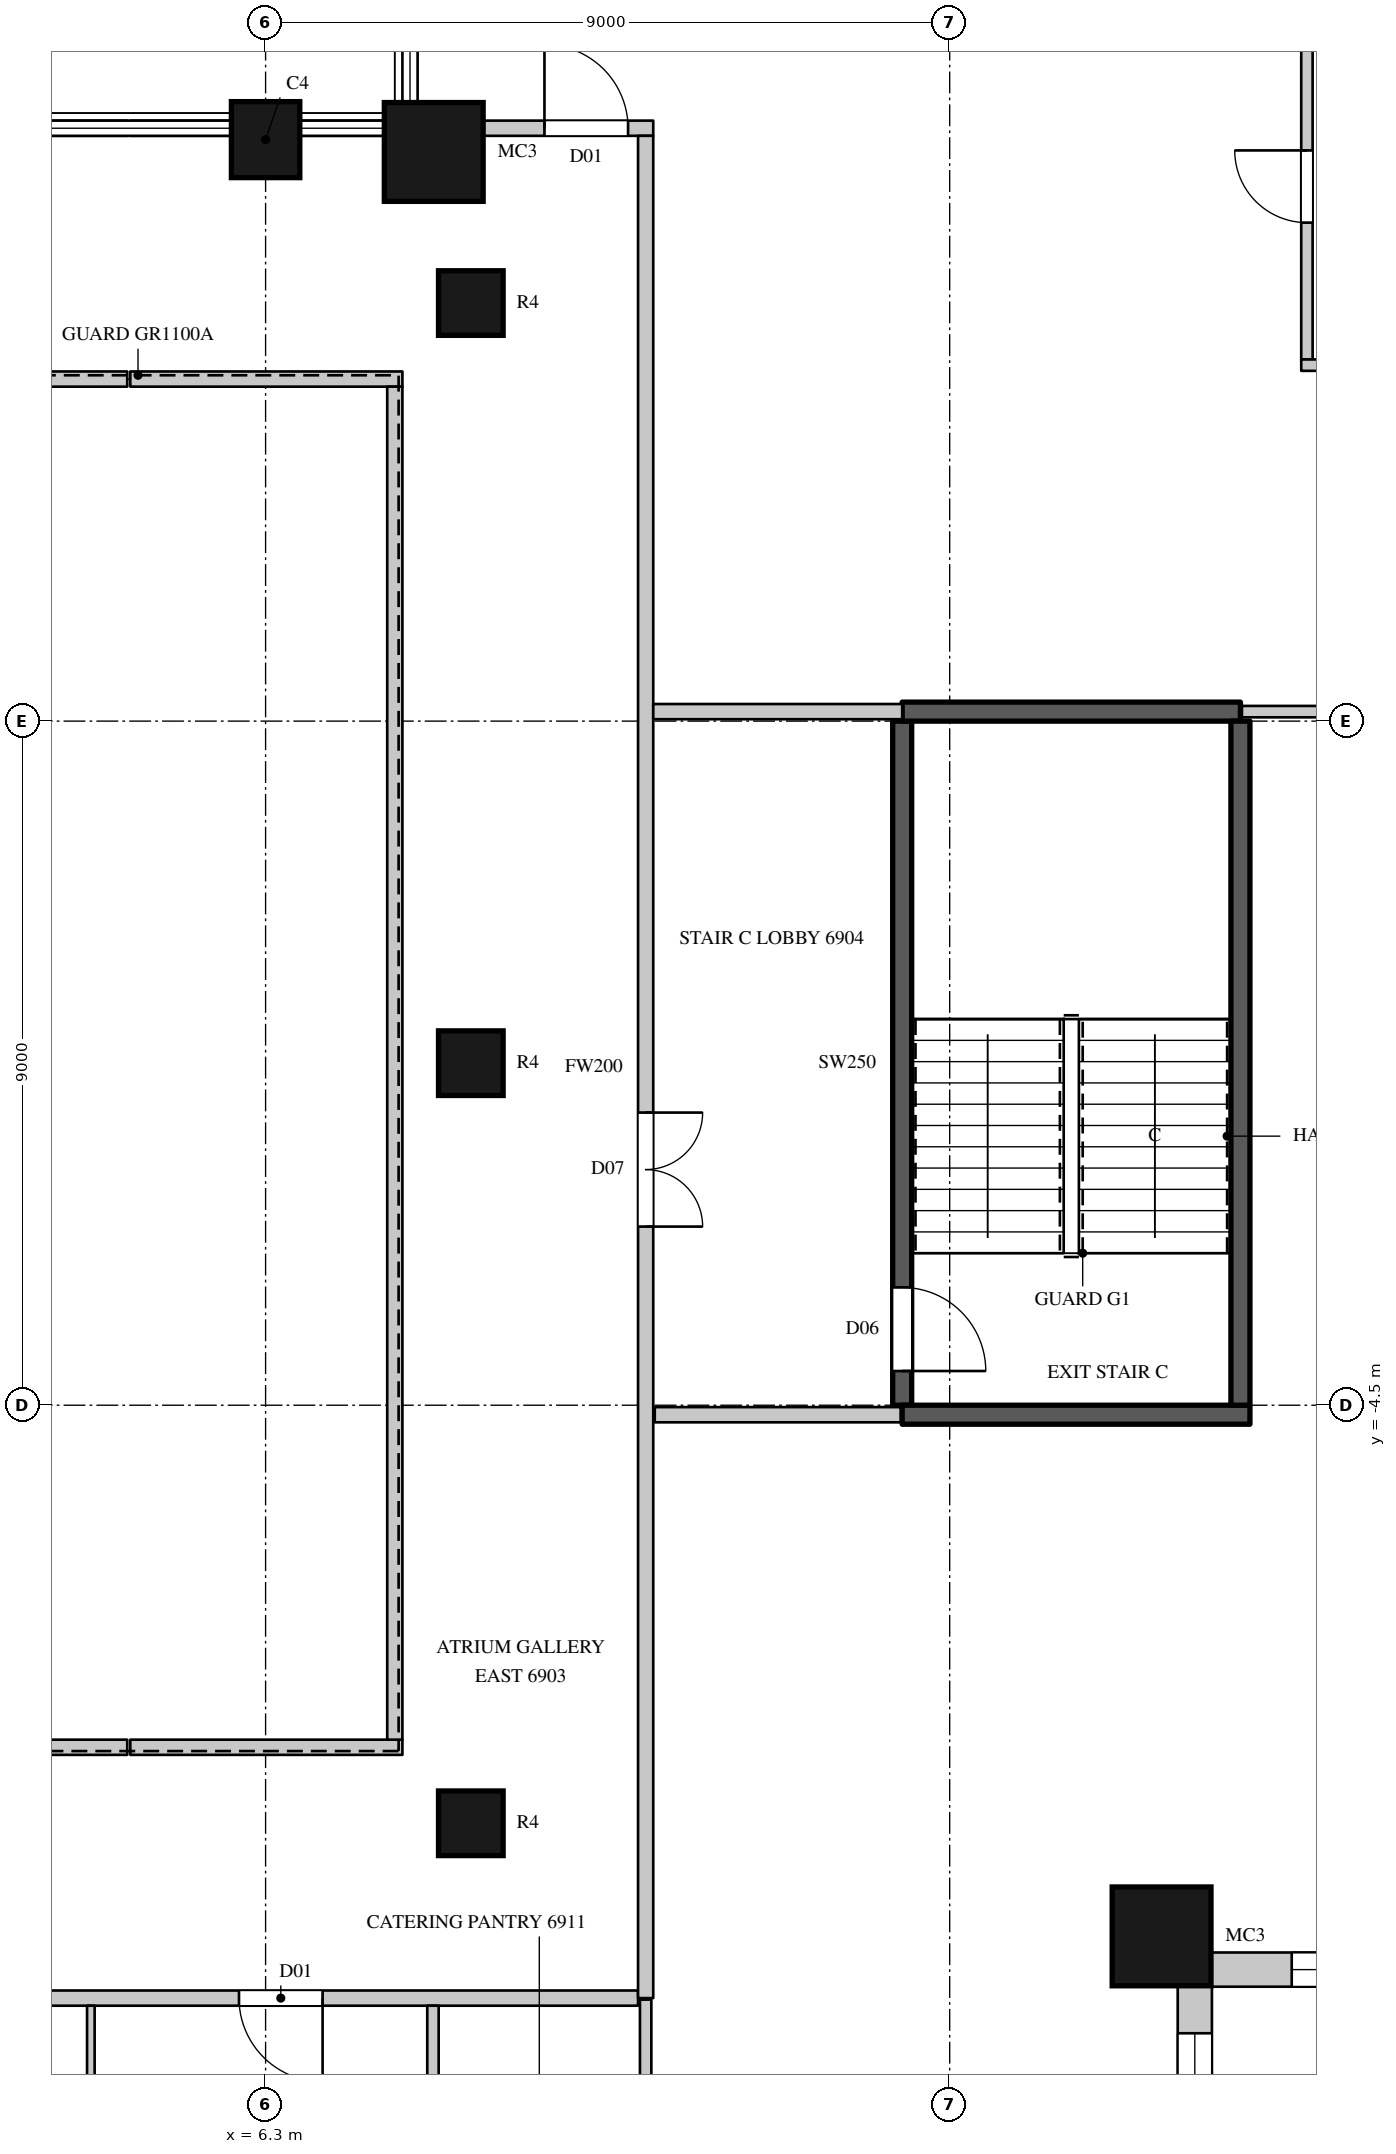
"""IFC4 building model, lengths in metres.
Left out: names, types, materials, properties, quantities, classifications, styles, units other than length and angle.
Written with IfcOpenShell. Run it as: python <this file> out.ifc"""

import sys

from ifc_helpers import new_model, si_unit, direction, frame, frame_2d, origin, origin_2d, place, context, subcontext, project, spatial, rectangle, circle, extrude, element, fill, save


model = new_model("IFC4")
c1 = context("Model", 3, precision=1e-05, world=origin(), true_north=direction((0.0, 1.0)))
c2 = subcontext(c1, "Body", "Model", "MODEL_VIEW")
j1 = project(units=[si_unit("LENGTHUNIT", "METRE"), si_unit("PLANEANGLEUNIT", "RADIAN")], contexts=[c1])
p1 = place(None, origin())
s1 = spatial("IfcSite", under=j1, at=p1, CompositionType="ELEMENT")
p2 = place(p1, origin())
s2 = spatial("IfcBuilding", under=s1, at=p2, CompositionType="ELEMENT")
p3 = place(p2, frame((0.0, 0.0, 304.9)))
s3 = spatial("IfcBuildingStorey", under=s2, at=p3, CompositionType="ELEMENT", Elevation=304.9)
p4 = place(p3, frame((8.512, 11.988, 0.0), z_axis=(0.0, 0.0, 1.0), x_axis=(1.0, 0.0, 0.0)))
e1 = element("IfcColumn", 1, at=p4, inside=s3, PredefinedType="COLUMN", context=c2, shape_type="SweptSolid", body=[
    extrude(circle(Radius=0.65, at=origin_2d()), origin(), (0.0, 0.0, 1.0), 4.1),
])
p5 = place(p3, frame((6.3, 12.15, 0.0), z_axis=(0.0, 0.0, 1.0), x_axis=(-1.0, 0.0, 0.0)))
e2 = element("IfcColumn", 2, at=p5, inside=s3, PredefinedType="COLUMN", context=c2, shape_type="SweptSolid", body=[
    extrude(rectangle(XDim=0.9, YDim=1.0, at=origin_2d()), origin(), (0.0, 0.0, 1.0), 4.1),
])
p6 = place(p3, frame((18.088, -11.488, 0.0), z_axis=(0.0, 0.0, 1.0), x_axis=(1.0, 0.0, 0.0)))
e3 = element("IfcColumn", 3, at=p6, inside=s3, PredefinedType="COLUMN", context=c2, shape_type="SweptSolid", body=[
    extrude(circle(Radius=0.65, at=origin_2d()), origin(), (0.0, 0.0, 1.0), 4.1),
])
for number, where, z_axis, x_axis in (
    (4, (9.0, -10.0, 0.0), (0.0, 0.0, 1.0), (1.0, 0.0, 0.0)),
    (5, (9.0, 0.0, 0.0), (0.0, 0.0, 1.0), (1.0, 0.0, 0.0)),
    (6, (9.0, 10.0, 0.0), (0.0, 0.0, 1.0), (1.0, 0.0, 0.0)),
):
    element("IfcColumn", number, at=place(p3, frame(where, z_axis=z_axis, x_axis=x_axis)), inside=s3, PredefinedType="COLUMN", context=c2, shape_type="SweptSolid", body=[
        extrude(circle(Radius=0.425, at=origin_2d()), origin(), (0.0, 0.0, 1.0), 4.1),
    ])
p7 = place(p3, frame((18.525, -16.304, 0.0), z_axis=(0.0, 0.0, 1.0), x_axis=(0.0, 1.0, 0.0)))
e7 = element("IfcWall", 7, at=p7, inside=s3, PredefinedType="SOLIDWALL", context=c2, shape_type="SweptSolid", body=[
    extrude(rectangle(XDim=4.202, YDim=0.45, at=frame_2d((2.101, 0.0))), origin(), (0.0, 0.0, 1.0), 3.8),
])
p8 = place(p7, frame((0.541, 0.0, 1.05)))
e8 = element("IfcOpeningElement", 8, at=p8, cuts=e7, PredefinedType="OPENING", context=c2, shape_type="SweptSolid", body=[
    extrude(rectangle(XDim=3.0, YDim=2.4, at=frame_2d((1.5, 1.2))), frame((0.0, 0.235, 0.0), z_axis=(0.0, -1.0, 0.0), x_axis=(1.0, 0.0, 0.0)), (0.0, 0.0, 1.0), 0.47),
])
p9 = place(p3, frame((18.701, -11.925, 0.0), z_axis=(0.0, 0.0, 1.0), x_axis=(1.0, 0.0, 0.0)))
e9 = element("IfcWall", 9, at=p9, inside=s3, PredefinedType="SOLIDWALL", context=c2, shape_type="SweptSolid", body=[
    extrude(rectangle(XDim=4.962, YDim=0.45, at=frame_2d((2.481, 0.0))), origin(), (0.0, 0.0, 1.0), 3.8),
])
p10 = place(p9, frame((1.098, 0.0, 1.05)))
e10 = element("IfcOpeningElement", 10, at=p10, cuts=e9, PredefinedType="OPENING", context=c2, shape_type="SweptSolid", body=[
    extrude(rectangle(XDim=3.0, YDim=2.4, at=frame_2d((1.5, 1.2))), frame((0.0, 0.235, 0.0), z_axis=(0.0, -1.0, 0.0), x_axis=(1.0, 0.0, 0.0)), (0.0, 0.0, 1.0), 0.47),
])
p11 = place(p3, frame((-10.9, -12.3, 0.0), z_axis=(0.0, 0.0, 1.0), x_axis=(1.0, 0.0, 0.0)))
e11 = element("IfcWall", 11, at=p11, inside=s3, PredefinedType="PARTITIONING", context=c2, shape_type="SweptSolid", body=[
    extrude(rectangle(XDim=22.1, YDim=0.2, at=frame_2d((11.05, 0.0))), origin(), (0.0, 0.0, 1.0), 3.8),
])
p12 = place(p11, frame((0.95, 0.0, 0.0)))
e12 = element("IfcOpeningElement", 12, at=p12, cuts=e11, PredefinedType="OPENING", context=c2, shape_type="SweptSolid", body=[
    extrude(rectangle(XDim=0.9, YDim=2.2, at=frame_2d((0.45, 1.1))), frame((0.0, 0.11, 0.0), z_axis=(0.0, -1.0, 0.0), x_axis=(1.0, 0.0, 0.0)), (0.0, 0.0, 1.0), 0.22),
])
p13 = place(p11, frame((3.95, 0.0, 0.0)))
e13 = element("IfcOpeningElement", 13, at=p13, cuts=e11, PredefinedType="OPENING", context=c2, shape_type="SweptSolid", body=[
    extrude(rectangle(XDim=0.9, YDim=2.2, at=frame_2d((0.45, 1.1))), frame((0.0, 0.11, 0.0), z_axis=(0.0, -1.0, 0.0), x_axis=(1.0, 0.0, 0.0)), (0.0, 0.0, 1.0), 0.22),
])
p14 = place(p11, frame((7.1, 0.0, 0.0)))
e14 = element("IfcOpeningElement", 14, at=p14, cuts=e11, PredefinedType="OPENING", context=c2, shape_type="SweptSolid", body=[
    extrude(rectangle(XDim=0.9, YDim=2.2, at=frame_2d((0.45, 1.1))), frame((0.0, 0.11, 0.0), z_axis=(0.0, -1.0, 0.0), x_axis=(1.0, 0.0, 0.0)), (0.0, 0.0, 1.0), 0.22),
])
p15 = place(p11, frame((10.0, 0.0, 0.0)))
e15 = element("IfcOpeningElement", 15, at=p15, cuts=e11, PredefinedType="OPENING", context=c2, shape_type="SweptSolid", body=[
    extrude(rectangle(XDim=0.9, YDim=2.2, at=frame_2d((0.45, 1.1))), frame((0.0, 0.11, 0.0), z_axis=(0.0, -1.0, 0.0), x_axis=(1.0, 0.0, 0.0)), (0.0, 0.0, 1.0), 0.22),
])
p16 = place(p11, frame((13.25, 0.0, 0.0)))
e16 = element("IfcOpeningElement", 16, at=p16, cuts=e11, PredefinedType="OPENING", context=c2, shape_type="SweptSolid", body=[
    extrude(rectangle(XDim=0.9, YDim=2.2, at=frame_2d((0.45, 1.1))), frame((0.0, 0.11, 0.0), z_axis=(0.0, -1.0, 0.0), x_axis=(1.0, 0.0, 0.0)), (0.0, 0.0, 1.0), 0.22),
])
p17 = place(p11, frame((16.85, 0.0, 0.0)))
e17 = element("IfcOpeningElement", 17, at=p17, cuts=e11, PredefinedType="OPENING", context=c2, shape_type="SweptSolid", body=[
    extrude(rectangle(XDim=1.1, YDim=2.4, at=frame_2d((0.55, 1.2))), frame((0.0, 0.11, 0.0), z_axis=(0.0, -1.0, 0.0), x_axis=(1.0, 0.0, 0.0)), (0.0, 0.0, 1.0), 0.22),
])
p18 = place(p3, frame((-2.25, 12.3, 0.0), z_axis=(0.0, 0.0, 1.0), x_axis=(1.0, 0.0, 0.0)))
e18 = element("IfcWall", 18, at=p18, inside=s3, PredefinedType="PARTITIONING", context=c2, shape_type="SweptSolid", body=[
    extrude(rectangle(XDim=6.73, YDim=0.2, at=frame_2d((3.365, 0.0))), origin(), (0.0, 0.0, 1.0), 3.8),
])
for number, where, z_axis, x_axis in (
    (19, (-6.1, -9.0, 0.0), (0.0, 0.0, 1.0), (1.0, 0.0, 0.0)),
    (20, (-6.1, 9.0, 0.0), (0.0, 0.0, 1.0), (1.0, 0.0, 0.0)),
):
    element("IfcWall", number, at=place(p3, frame(where, z_axis=z_axis, x_axis=x_axis)), inside=s3, PredefinedType="PARTITIONING", context=c2, shape_type="SweptSolid", body=[
        extrude(rectangle(XDim=10.58, YDim=0.2, at=frame_2d((5.29, 0.0))), origin(), (0.0, 0.0, 1.0), 3.8),
    ])
for number, where, z_axis, x_axis in (
    (21, (4.52, -9.0, 0.0), (0.0, 0.0, 1.0), (1.0, 0.0, 0.0)),
    (22, (4.52, 9.0, 0.0), (0.0, 0.0, 1.0), (1.0, 0.0, 0.0)),
):
    element("IfcWall", number, at=place(p3, frame(where, z_axis=z_axis, x_axis=x_axis)), inside=s3, PredefinedType="PARTITIONING", context=c2, shape_type="SweptSolid", body=[
        extrude(rectangle(XDim=3.58, YDim=0.2, at=frame_2d((1.79, 0.0))), origin(), (0.0, 0.0, 1.0), 3.8),
    ])
p19 = place(p3, frame((4.52, 12.3, 0.0), z_axis=(0.0, 0.0, 1.0), x_axis=(1.0, 0.0, 0.0)))
e23 = element("IfcWall", 23, at=p19, inside=s3, PredefinedType="PARTITIONING", context=c2, shape_type="SweptSolid", body=[
    extrude(rectangle(XDim=1.33, YDim=0.2, at=frame_2d((0.665, 0.0))), origin(), (0.0, 0.0, 1.0), 3.8),
])
p20 = place(p3, frame((6.75, 12.3, 0.0), z_axis=(0.0, 0.0, 1.0), x_axis=(1.0, 0.0, 0.0)))
e24 = element("IfcWall", 24, at=p20, inside=s3, PredefinedType="PARTITIONING", context=c2, shape_type="SweptSolid", body=[
    extrude(rectangle(XDim=1.156, YDim=0.2, at=frame_2d((0.578, 0.0))), origin(), (0.0, 0.0, 1.0), 3.8),
])
p21 = place(p3, frame((8.0, -8.9, 0.0), z_axis=(0.0, 0.0, 1.0), x_axis=(0.0, 1.0, 0.0)))
e25 = element("IfcWall", 25, at=p21, inside=s3, PredefinedType="PARTITIONING", context=c2, shape_type="SweptSolid", body=[
    extrude(rectangle(XDim=17.8, YDim=0.2, at=frame_2d((8.9, 0.0))), origin(), (0.0, 0.0, 1.0), 3.8),
])
p22 = place(p3, frame((9.119, 12.3, 0.0), z_axis=(0.0, 0.0, 1.0), x_axis=(1.0, 0.0, 0.0)))
e26 = element("IfcWall", 26, at=p22, inside=s3, PredefinedType="PARTITIONING", context=c2, shape_type="SweptSolid", body=[
    extrude(rectangle(XDim=2.281, YDim=0.2, at=frame_2d((1.141, 0.0))), origin(), (0.0, 0.0, 1.0), 3.8),
])
p23 = place(p22, frame((0.85, 0.0, 0.0)))
e27 = element("IfcOpeningElement", 27, at=p23, cuts=e26, PredefinedType="OPENING", context=c2, shape_type="SweptSolid", body=[
    extrude(rectangle(XDim=1.1, YDim=2.4, at=frame_2d((0.55, 1.2))), frame((0.0, 0.11, 0.0), z_axis=(0.0, -1.0, 0.0), x_axis=(1.0, 0.0, 0.0)), (0.0, 0.0, 1.0), 0.22),
])
p24 = place(p3, frame((11.3, -12.3, 0.0), z_axis=(0.0, 0.0, 1.0), x_axis=(0.0, 1.0, 0.0)))
e28 = element("IfcWall", 28, at=p24, inside=s3, PredefinedType="PARTITIONING", context=c2, shape_type="SweptSolid", body=[
    extrude(rectangle(XDim=24.5, YDim=0.2, at=frame_2d((12.25, 0.0))), origin(), (0.0, 0.0, 1.0), 3.8),
])
p25 = place(p24, frame((10.15, 0.0, 0.0)))
e29 = element("IfcOpeningElement", 29, at=p25, cuts=e28, PredefinedType="OPENING", context=c2, shape_type="SweptSolid", body=[
    extrude(rectangle(XDim=1.5, YDim=2.4, at=frame_2d((0.75, 1.2))), frame((0.0, 0.11, 0.0), z_axis=(0.0, -1.0, 0.0), x_axis=(1.0, 0.0, 0.0)), (0.0, 0.0, 1.0), 0.22),
])
p26 = place(p3, frame((11.4, 4.625, 0.0), z_axis=(0.0, 0.0, 1.0), x_axis=(1.0, 0.0, 0.0)))
e30 = element("IfcWall", 30, at=p26, inside=s3, PredefinedType="PARTITIONING", context=c2, shape_type="SweptSolid", body=[
    extrude(rectangle(XDim=3.275, YDim=0.2, at=frame_2d((1.638, 0.0))), origin(), (0.0, 0.0, 1.0), 3.8),
])
p27 = place(p3, frame((11.42, -4.625, 0.0), z_axis=(0.0, 0.0, 1.0), x_axis=(1.0, 0.0, 0.0)))
e31 = element("IfcWall", 31, at=p27, inside=s3, PredefinedType="PARTITIONING", context=c2, shape_type="SweptSolid", body=[
    extrude(rectangle(XDim=3.235, YDim=0.2, at=frame_2d((1.618, 0.0))), origin(), (0.0, 0.0, 1.0), 3.8),
])
p28 = place(p3, frame((8.502, -16.425, 0.0), z_axis=(0.0, 0.0, 1.0), x_axis=(0.0, 1.0, 0.0)))
e32 = element("IfcWall", 32, at=p28, inside=s3, PredefinedType="PARTITIONING", context=c2, shape_type="SweptSolid", body=[
    extrude(rectangle(XDim=4.025, YDim=0.15, at=frame_2d((2.013, 0.0))), origin(), (0.0, 0.0, 1.0), 3.8),
])
p29 = place(p28, frame((1.55, 0.0, 0.0)))
e33 = element("IfcOpeningElement", 33, at=p29, cuts=e32, PredefinedType="OPENING", context=c2, shape_type="SweptSolid", body=[
    extrude(rectangle(XDim=0.95, YDim=2.2, at=frame_2d((0.475, 1.1))), frame((0.0, 0.085, 0.0), z_axis=(0.0, -1.0, 0.0), x_axis=(1.0, 0.0, 0.0)), (0.0, 0.0, 1.0), 0.17),
])
p30 = place(p3, frame((11.3, -16.5, 0.0), z_axis=(0.0, 0.0, 1.0), x_axis=(0.0, 1.0, 0.0)))
e34 = element("IfcWall", 34, at=p30, inside=s3, PredefinedType="PARTITIONING", context=c2, shape_type="SweptSolid", body=[
    extrude(rectangle(XDim=4.18, YDim=0.15, at=frame_2d((2.09, 0.0))), origin(), (0.0, 0.0, 1.0), 3.8),
])
p31 = place(p3, frame((19.145, 4.625, 0.0), z_axis=(0.0, 0.0, 1.0), x_axis=(1.0, 0.0, 0.0)))
e35 = element("IfcWall", 35, at=p31, inside=s3, PredefinedType="PARTITIONING", context=c2, shape_type="SweptSolid", body=[
    extrude(rectangle(XDim=4.605, YDim=0.15, at=frame_2d((2.302, 0.0))), origin(), (0.0, 0.0, 1.0), 3.8),
])
p32 = place(p3, frame((20.0, 9.258, 0.0), z_axis=(0.0, 0.0, 1.0), x_axis=(0.0, 1.0, 0.0)))
e36 = element("IfcWall", 36, at=p32, inside=s3, PredefinedType="PARTITIONING", context=c2, shape_type="SweptSolid", body=[
    extrude(rectangle(XDim=4.532, YDim=0.15, at=frame_2d((2.266, 0.0))), origin(), (0.0, 0.0, 1.0), 3.8),
])
p33 = place(p32, frame((1.8, 0.0, 0.0)))
e37 = element("IfcOpeningElement", 37, at=p33, cuts=e36, PredefinedType="OPENING", context=c2, shape_type="SweptSolid", body=[
    extrude(rectangle(XDim=0.95, YDim=2.2, at=frame_2d((0.475, 1.1))), frame((0.0, 0.085, 0.0), z_axis=(0.0, -1.0, 0.0), x_axis=(1.0, 0.0, 0.0)), (0.0, 0.0, 1.0), 0.17),
])
p34 = place(p3, frame((19.925, 9.183, 0.0), z_axis=(0.0, 0.0, 1.0), x_axis=(1.0, 0.0, 0.0)))
e38 = element("IfcWall", 38, at=p34, inside=s3, PredefinedType="PARTITIONING", context=c2, shape_type="SweptSolid", body=[
    extrude(rectangle(XDim=4.375, YDim=0.15, at=frame_2d((2.188, 0.0))), origin(), (0.0, 0.0, 1.0), 3.15),
])
p35 = place(p3, frame((14.675, -4.5, 0.0), z_axis=(0.0, 0.0, 1.0), x_axis=(0.0, 1.0, 0.0)))
e39 = element("IfcWall", 39, at=p35, inside=s3, PredefinedType="SHEAR", context=c2, shape_type="SweptSolid", body=[
    extrude(rectangle(XDim=9.0, YDim=0.25, at=frame_2d((4.5, 0.0))), origin(), (0.0, 0.0, 1.0), 3.8),
])
p36 = place(p35, frame((0.45, 0.0, 0.0)))
e40 = element("IfcOpeningElement", 40, at=p36, cuts=e39, PredefinedType="OPENING", context=c2, shape_type="SweptSolid", body=[
    extrude(rectangle(XDim=1.1, YDim=2.2, at=frame_2d((0.55, 1.1))), frame((0.0, 0.135, 0.0), z_axis=(0.0, -1.0, 0.0), x_axis=(1.0, 0.0, 0.0)), (0.0, 0.0, 1.0), 0.27),
])
p37 = place(p3, frame((14.675, -4.625, 0.0), z_axis=(0.0, 0.0, 1.0), x_axis=(1.0, 0.0, 0.0)))
e41 = element("IfcWall", 41, at=p37, inside=s3, PredefinedType="SHEAR", context=c2, shape_type="SweptSolid", body=[
    extrude(rectangle(XDim=4.575, YDim=0.25, at=frame_2d((2.288, 0.0))), origin(), (0.0, 0.0, 1.0), 3.8),
])
p38 = place(p3, frame((14.675, 4.625, 0.0), z_axis=(0.0, 0.0, 1.0), x_axis=(1.0, 0.0, 0.0)))
e42 = element("IfcWall", 42, at=p38, inside=s3, PredefinedType="SHEAR", context=c2, shape_type="SweptSolid", body=[
    extrude(rectangle(XDim=4.45, YDim=0.25, at=frame_2d((2.225, 0.0))), origin(), (0.0, 0.0, 1.0), 3.8),
])
p39 = place(p3, frame((19.125, -4.5, 0.0), z_axis=(0.0, 0.0, 1.0), x_axis=(0.0, 1.0, 0.0)))
e43 = element("IfcWall", 43, at=p39, inside=s3, PredefinedType="SHEAR", context=c2, shape_type="SweptSolid", body=[
    extrude(rectangle(XDim=9.0, YDim=0.25, at=frame_2d((4.5, 0.0))), origin(), (0.0, 0.0, 1.0), 3.8),
])
p40 = place(p3, frame((4.001, -22.999, 0.0), z_axis=(0.0, 0.0, 1.0), x_axis=(0.0, 1.0, 0.0)))
e44 = element("IfcWall", 44, at=p40, inside=s3, PredefinedType="PARTITIONING", context=c2, shape_type="SweptSolid", body=[
    extrude(rectangle(XDim=10.599, YDim=0.1, at=frame_2d((5.3, 0.0))), origin(), (0.0, 0.0, 1.0), 3.8),
])
p41 = place(p8, origin())
e45 = element("IfcWindow", 45, at=p41, inside=s3, PartitioningType="SINGLE_PANEL", PredefinedType="WINDOW", context=c2, shape_type="SweptSolid", body=[
    extrude(rectangle(XDim=3.0, YDim=2.4, at=frame_2d((1.5, 1.2))), frame((0.0, 0.135, 0.0), z_axis=(0.0, -1.0, 0.0), x_axis=(1.0, 0.0, 0.0)), (0.0, 0.0, 1.0), 0.06),
])
fill(e8, e45)
p42 = place(p10, origin())
e46 = element("IfcWindow", 46, at=p42, inside=s3, PartitioningType="SINGLE_PANEL", PredefinedType="WINDOW", context=c2, shape_type="SweptSolid", body=[
    extrude(rectangle(XDim=3.0, YDim=2.4, at=frame_2d((1.5, 1.2))), frame((0.0, 0.135, 0.0), z_axis=(0.0, -1.0, 0.0), x_axis=(1.0, 0.0, 0.0)), (0.0, 0.0, 1.0), 0.06),
])
fill(e10, e46)
p43 = place(p25, origin())
e47 = element("IfcDoor", 47, at=p43, inside=s3, OperationType="DOUBLE_DOOR_SINGLE_SWING", PredefinedType="DOOR", context=c2, shape_type="SweptSolid", body=[
    extrude(rectangle(XDim=1.5, YDim=2.4, at=frame_2d((0.75, 1.2))), frame((0.0, 0.025, 0.0), z_axis=(0.0, -1.0, 0.0), x_axis=(1.0, 0.0, 0.0)), (0.0, 0.0, 1.0), 0.05),
])
fill(e29, e47)
p44 = place(p17, origin())
e48 = element("IfcDoor", 48, at=p44, inside=s3, OperationType="SINGLE_SWING_LEFT", PredefinedType="DOOR", context=c2, shape_type="SweptSolid", body=[
    extrude(rectangle(XDim=1.1, YDim=2.4, at=frame_2d((0.55, 1.2))), frame((0.0, 0.025, 0.0), z_axis=(0.0, -1.0, 0.0), x_axis=(1.0, 0.0, 0.0)), (0.0, 0.0, 1.0), 0.05),
])
fill(e17, e48)
p45 = place(p23, origin())
e49 = element("IfcDoor", 49, at=p45, inside=s3, OperationType="SINGLE_SWING_LEFT", PredefinedType="DOOR", context=c2, shape_type="SweptSolid", body=[
    extrude(rectangle(XDim=1.1, YDim=2.4, at=frame_2d((0.55, 1.2))), frame((0.0, 0.025, 0.0), z_axis=(0.0, -1.0, 0.0), x_axis=(1.0, 0.0, 0.0)), (0.0, 0.0, 1.0), 0.05),
])
fill(e27, e49)
p46 = place(p33, origin())
e50 = element("IfcDoor", 50, at=p46, inside=s3, OperationType="SINGLE_SWING_RIGHT", PredefinedType="DOOR", context=c2, shape_type="SweptSolid", body=[
    extrude(rectangle(XDim=0.95, YDim=2.2, at=frame_2d((0.475, 1.1))), frame((0.0, 0.025, 0.0), z_axis=(0.0, -1.0, 0.0), x_axis=(1.0, 0.0, 0.0)), (0.0, 0.0, 1.0), 0.05),
])
fill(e37, e50)
p47 = place(p36, origin())
e51 = element("IfcDoor", 51, at=p47, inside=s3, OperationType="SINGLE_SWING_RIGHT", PredefinedType="DOOR", context=c2, shape_type="SweptSolid", body=[
    extrude(rectangle(XDim=1.1, YDim=2.2, at=frame_2d((0.55, 1.1))), frame((0.0, 0.025, 0.0), z_axis=(0.0, -1.0, 0.0), x_axis=(1.0, 0.0, 0.0)), (0.0, 0.0, 1.0), 0.05),
])
fill(e40, e51)
save(model, sys.argv[1])
